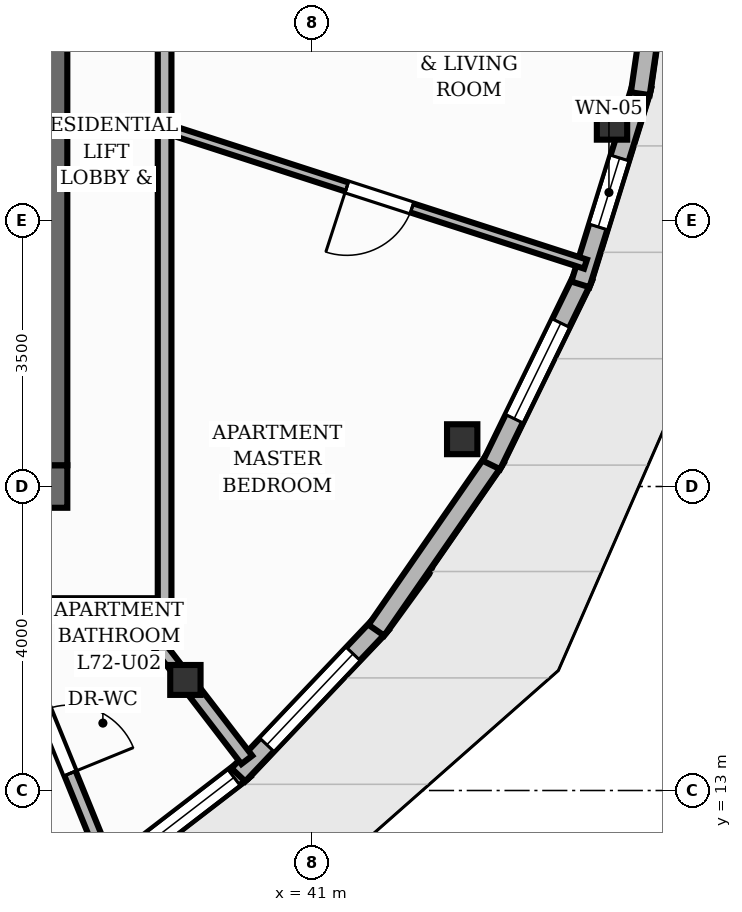
"""IFC4 building model, lengths in metres.
Left out: names, types, materials, properties, quantities, classifications, styles, units other than length and angle.
Written with IfcOpenShell. Run it as: python <this file> out.ifc"""

import sys

from ifc_helpers import new_model, si_unit, direction, frame, frame_2d, origin, origin_2d, place, context, subcontext, project, spatial, rectangle, i_section, extrude, element, fill, save


model = new_model("IFC4")
c1 = context("Model", 3, precision=1e-05, world=origin(), true_north=direction((0.0, 1.0)))
c2 = subcontext(c1, "Body", "Model", "MODEL_VIEW")
j1 = project(units=[si_unit("LENGTHUNIT", "METRE"), si_unit("PLANEANGLEUNIT", "RADIAN")], contexts=[c1])
p1 = place(None, origin())
s1 = spatial("IfcSite", under=j1, at=p1, CompositionType="ELEMENT")
p2 = place(p1, origin())
s2 = spatial("IfcBuilding", under=s1, at=p2, CompositionType="ELEMENT")
p3 = place(p2, frame((0.0, 0.0, 239.84)))
s3 = spatial("IfcBuildingStorey", under=s2, at=p3, CompositionType="ELEMENT", Elevation=239.84)
p4 = place(p3, frame((26.22, 17.0, 0.0), z_axis=(0.0, 0.0, 1.0), x_axis=(1.0, 0.0, 0.0)))
e1 = element("IfcWall", 1, at=p4, inside=s3, PredefinedType="SHEAR", context=c2, shape_type="SweptSolid", body=[
    extrude(rectangle(XDim=11.56, YDim=0.56, at=frame_2d((5.78, 0.0))), origin(), (0.0, 0.0, 1.0), 3.2),
])
p5 = place(p4, frame((2.28, 0.0, 0.0)))
e2 = element("IfcOpeningElement", 2, at=p5, cuts=e1, PredefinedType="OPENING", context=c2, shape_type="SweptSolid", body=[
    extrude(rectangle(XDim=1.1, YDim=2.15, at=frame_2d((0.55, 1.075))), frame((0.0, 0.29, 0.0), z_axis=(0.0, -1.0, 0.0), x_axis=(1.0, 0.0, 0.0)), (0.0, 0.0, 1.0), 0.58),
])
p6 = place(p4, frame((5.83, 0.0, 0.0)))
e3 = element("IfcOpeningElement", 3, at=p6, cuts=e1, PredefinedType="OPENING", context=c2, shape_type="SweptSolid", body=[
    extrude(rectangle(XDim=0.9, YDim=2.1, at=frame_2d((0.45, 1.05))), frame((0.0, 0.29, 0.0), z_axis=(0.0, -1.0, 0.0), x_axis=(1.0, 0.0, 0.0)), (0.0, 0.0, 1.0), 0.58),
])
p7 = place(p3, frame((37.5, 17.28, 0.0), z_axis=(0.0, 0.0, 1.0), x_axis=(0.0, 1.0, 0.0)))
e4 = element("IfcWall", 4, at=p7, inside=s3, PredefinedType="SHEAR", context=c2, shape_type="SweptSolid", body=[
    extrude(rectangle(XDim=13.44, YDim=0.56, at=frame_2d((6.72, 0.0))), origin(), (0.0, 0.0, 1.0), 3.2),
])
for number, where, z_axis, x_axis in (
    (5, (39.333, 14.455, 0.0), (0.0, 0.0, 1.0), (1.0, 0.0, 0.0)),
    (6, (42.975, 17.622, 0.0), (0.0, 0.0, 1.0), (1.0, 0.0, 0.0)),
    (7, (44.946, 21.76, 0.0), (0.0, 0.0, 1.0), (1.0, 0.0, 0.0)),
):
    element("IfcColumn", number, at=place(p3, frame(where, z_axis=z_axis, x_axis=x_axis)), inside=s3, PredefinedType="COLUMN", context=c2, shape_type="SweptSolid", body=[
        extrude(i_section(OverallWidth=0.399, OverallDepth=0.394, WebThickness=0.023, FlangeThickness=0.037, at=origin_2d()), origin(), (0.0, 0.0, 1.0), 3.2),
    ])
p8 = place(p3, frame((40.111, 13.279, 0.0), z_axis=(0.0, 0.0, 1.0), x_axis=(-0.792543354822, -0.609815571076, 0.0)))
e8 = element("IfcWall", 8, at=p8, inside=s3, PredefinedType="SOLIDWALL", context=c2, shape_type="SweptSolid", body=[
    extrude(rectangle(XDim=2.702, YDim=0.25, at=frame_2d((1.351, 0.0))), origin(), (0.0, 0.0, 1.0), 2.88),
])
p9 = place(p8, frame((0.175, 0.0, 0.85)))
e9 = element("IfcOpeningElement", 9, at=p9, cuts=e8, PredefinedType="OPENING", context=c2, shape_type="SweptSolid", body=[
    extrude(rectangle(XDim=1.65, YDim=1.44, at=frame_2d((0.825, 0.72))), frame((0.0, 0.135, 0.0), z_axis=(0.0, -1.0, 0.0), x_axis=(1.0, 0.0, 0.0)), (0.0, 0.0, 1.0), 0.27),
])
p10 = place(p3, frame((41.915, 15.193, 0.0), z_axis=(0.0, 0.0, 1.0), x_axis=(-0.688046261031, -0.725666826223, 0.0)))
e10 = element("IfcWall", 10, at=p10, inside=s3, PredefinedType="SOLIDWALL", context=c2, shape_type="SweptSolid", body=[
    extrude(rectangle(XDim=2.739, YDim=0.25, at=frame_2d((1.369, 0.0))), origin(), (0.0, 0.0, 1.0), 2.88),
])
p11 = place(p10, frame((0.544, 0.0, 0.85)))
e11 = element("IfcOpeningElement", 11, at=p11, cuts=e10, PredefinedType="OPENING", context=c2, shape_type="SweptSolid", body=[
    extrude(rectangle(XDim=1.65, YDim=1.55, at=frame_2d((0.825, 0.775))), frame((0.0, 0.135, 0.0), z_axis=(0.0, -1.0, 0.0), x_axis=(1.0, 0.0, 0.0)), (0.0, 0.0, 1.0), 0.27),
])
p12 = place(p3, frame((43.416, 17.376, 0.0), z_axis=(0.0, 0.0, 1.0), x_axis=(-0.569421689582, -0.822045582333, 0.0)))
e12 = element("IfcWall", 12, at=p12, inside=s3, PredefinedType="SOLIDWALL", context=c2, shape_type="SweptSolid", body=[
    extrude(rectangle(XDim=2.758, YDim=0.25, at=frame_2d((1.379, 0.0))), origin(), (0.0, 0.0, 1.0), 2.88),
])
p13 = place(p3, frame((44.571, 19.761, 0.0), z_axis=(0.0, 0.0, 1.0), x_axis=(-0.438517804861, -0.898722501565, 0.0)))
e13 = element("IfcWall", 13, at=p13, inside=s3, PredefinedType="SOLIDWALL", context=c2, shape_type="SweptSolid", body=[
    extrude(rectangle(XDim=2.758, YDim=0.25, at=frame_2d((1.379, 0.0))), origin(), (0.0, 0.0, 1.0), 2.88),
])
p14 = place(p13, frame((0.679, 0.0, 0.85)))
e14 = element("IfcOpeningElement", 14, at=p14, cuts=e13, PredefinedType="OPENING", context=c2, shape_type="SweptSolid", body=[
    extrude(rectangle(XDim=1.4, YDim=1.55, at=frame_2d((0.7, 0.775))), frame((0.0, 0.135, 0.0), z_axis=(0.0, -1.0, 0.0), x_axis=(1.0, 0.0, 0.0)), (0.0, 0.0, 1.0), 0.27),
])
p15 = place(p3, frame((45.343, 22.275, 0.0), z_axis=(0.0, 0.0, 1.0), x_axis=(-0.29642164717, -0.955057174775, 0.0)))
e15 = element("IfcWall", 15, at=p15, inside=s3, PredefinedType="SOLIDWALL", context=c2, shape_type="SweptSolid", body=[
    extrude(rectangle(XDim=2.739, YDim=0.25, at=frame_2d((1.369, 0.0))), origin(), (0.0, 0.0, 1.0), 2.497),
])
p16 = place(p15, frame((0.997, 0.0, 0.85)))
e16 = element("IfcOpeningElement", 16, at=p16, cuts=e15, PredefinedType="OPENING", context=c2, shape_type="SweptSolid", body=[
    extrude(rectangle(XDim=0.95, YDim=1.45, at=frame_2d((0.475, 0.725))), frame((0.0, 0.135, 0.0), z_axis=(0.0, -1.0, 0.0), x_axis=(1.0, 0.0, 0.0)), (0.0, 0.0, 1.0), 0.27),
])
p17 = place(p3, frame((45.708, 24.842, 0.0), z_axis=(0.0, 0.0, 1.0), x_axis=(-0.144229466115, -0.989544269401, 0.0)))
e17 = element("IfcWall", 17, at=p17, inside=s3, PredefinedType="SOLIDWALL", context=c2, shape_type="SweptSolid", body=[
    extrude(rectangle(XDim=2.702, YDim=0.25, at=frame_2d((1.351, 0.0))), origin(), (0.0, 0.0, 1.0), 2.497),
])
p18 = place(p17, frame((0.651, 0.0, 0.85)))
e18 = element("IfcOpeningElement", 18, at=p18, cuts=e17, PredefinedType="OPENING", context=c2, shape_type="SweptSolid", body=[
    extrude(rectangle(XDim=1.4, YDim=1.55, at=frame_2d((0.7, 0.775))), frame((0.0, 0.135, 0.0), z_axis=(0.0, -1.0, 0.0), x_axis=(1.0, 0.0, 0.0)), (0.0, 0.0, 1.0), 0.27),
])
p19 = place(p3, frame((39.467, 14.281, 0.0), z_axis=(0.0, 0.0, 1.0), x_axis=(0.609209464238, -0.793009349682, 0.0)))
e19 = element("IfcWall", 19, at=p19, inside=s3, PredefinedType="PARTITIONING", context=c2, shape_type="SweptSolid", body=[
    extrude(rectangle(XDim=1.106, YDim=0.18, at=frame_2d((0.553, 0.0))), origin(), (0.0, 0.0, 1.0), 2.323),
])
p20 = place(p3, frame((39.06, 15.44, 0.0), z_axis=(0.0, 0.0, 1.0), x_axis=(-1.0, 0.0, 0.0)))
e20 = element("IfcWall", 20, at=p20, inside=s3, PredefinedType="PARTITIONING", context=c2, shape_type="SweptSolid", body=[
    extrude(rectangle(XDim=5.672, YDim=0.18, at=frame_2d((2.836, 0.0))), origin(), (0.0, 0.0, 1.0), 2.875),
])
p21 = place(p20, frame((3.373, 0.0, 0.0)))
e21 = element("IfcOpeningElement", 21, at=p21, cuts=e20, PredefinedType="OPENING", context=c2, shape_type="SweptSolid", body=[
    extrude(rectangle(XDim=1.05, YDim=2.15, at=frame_2d((0.525, 1.075))), frame((0.0, 0.1, 0.0), z_axis=(0.0, -1.0, 0.0), x_axis=(1.0, 0.0, 0.0)), (0.0, 0.0, 1.0), 0.2),
])
p22 = place(p3, frame((39.06, 29.391, 0.0), z_axis=(0.0, 0.0, 1.0), x_axis=(0.0, -1.0, 0.0)))
e22 = element("IfcWall", 22, at=p22, inside=s3, PredefinedType="PARTITIONING", context=c2, shape_type="SweptSolid", body=[
    extrude(rectangle(XDim=13.951, YDim=0.18, at=frame_2d((6.975, 0.0))), origin(), (0.0, 0.0, 1.0), 2.875),
])
p23 = place(p22, frame((5.593, 0.0, 0.0)))
e23 = element("IfcOpeningElement", 23, at=p23, cuts=e22, PredefinedType="OPENING", context=c2, shape_type="SweptSolid", body=[
    extrude(rectangle(XDim=1.05, YDim=2.15, at=frame_2d((0.525, 1.075))), frame((0.0, 0.1, 0.0), z_axis=(0.0, -1.0, 0.0), x_axis=(1.0, 0.0, 0.0)), (0.0, 0.0, 1.0), 0.2),
])
p24 = place(p22, frame((1.645, 0.0, 0.0)))
e24 = element("IfcOpeningElement", 24, at=p24, cuts=e22, PredefinedType="OPENING", context=c2, shape_type="SweptSolid", body=[
    extrude(rectangle(XDim=0.9, YDim=2.1, at=frame_2d((0.45, 1.05))), frame((0.0, 0.1, 0.0), z_axis=(0.0, -1.0, 0.0), x_axis=(1.0, 0.0, 0.0)), (0.0, 0.0, 1.0), 0.2),
])
p25 = place(p3, frame((36.951, 15.347, 0.0), z_axis=(0.0, 0.0, 1.0), x_axis=(0.377313729351, -0.92608549802, 0.0)))
e25 = element("IfcWall", 25, at=p25, inside=s3, PredefinedType="PLUMBINGWALL", context=c2, shape_type="SweptSolid", body=[
    extrude(rectangle(XDim=3.684, YDim=0.16, at=frame_2d((1.842, 0.0))), origin(), (0.0, 0.0, 1.0), 2.612),
])
p26 = place(p25, frame((1.392, 0.0, 0.0)))
e26 = element("IfcOpeningElement", 26, at=p26, cuts=e25, PredefinedType="OPENING", context=c2, shape_type="SweptSolid", body=[
    extrude(rectangle(XDim=0.9, YDim=2.1, at=frame_2d((0.45, 1.05))), frame((0.0, 0.09, 0.0), z_axis=(0.0, -1.0, 0.0), x_axis=(1.0, 0.0, 0.0)), (0.0, 0.0, 1.0), 0.18),
])
p27 = place(p3, frame((38.637, 15.361, 0.0), z_axis=(0.0, 0.0, 1.0), x_axis=(0.609314315131, -0.7929287896, 0.0)))
e27 = element("IfcWall", 27, at=p27, inside=s3, PredefinedType="PLUMBINGWALL", context=c2, shape_type="SweptSolid", body=[
    extrude(rectangle(XDim=0.923, YDim=0.16, at=frame_2d((0.461, 0.0))), origin(), (0.0, 0.0, 1.0), 2.323),
])
p28 = place(p3, frame((44.598, 19.926, 0.0), z_axis=(0.0, 0.0, 1.0), x_axis=(-0.951480669713, 0.307708523058, 0.0)))
e28 = element("IfcWall", 28, at=p28, inside=s3, PredefinedType="PARTITIONING", context=c2, shape_type="SweptSolid", body=[
    extrude(rectangle(XDim=5.7, YDim=0.125, at=frame_2d((2.85, 0.0))), origin(), (0.0, 0.0, 1.0), 2.612),
])
p29 = place(p28, frame((2.4, 0.0, 0.0)))
e29 = element("IfcOpeningElement", 29, at=p29, cuts=e28, PredefinedType="OPENING", context=c2, shape_type="SweptSolid", body=[
    extrude(rectangle(XDim=0.9, YDim=2.1, at=frame_2d((0.45, 1.05))), frame((0.0, 0.073, 0.0), z_axis=(0.0, -1.0, 0.0), x_axis=(1.0, 0.0, 0.0)), (0.0, 0.0, 1.0), 0.145),
])
p30 = place(p9, origin())
e30 = element("IfcWindow", 30, at=p30, inside=s3, PartitioningType="SINGLE_PANEL", PredefinedType="WINDOW", context=c2, shape_type="SweptSolid", body=[
    extrude(rectangle(XDim=1.65, YDim=1.44, at=frame_2d((0.825, 0.72))), frame((0.0, 0.03, 0.0), z_axis=(0.0, -1.0, 0.0), x_axis=(1.0, 0.0, 0.0)), (0.0, 0.0, 1.0), 0.06),
])
fill(e9, e30)
p31 = place(p11, origin())
e31 = element("IfcWindow", 31, at=p31, inside=s3, PartitioningType="SINGLE_PANEL", PredefinedType="WINDOW", context=c2, shape_type="SweptSolid", body=[
    extrude(rectangle(XDim=1.65, YDim=1.55, at=frame_2d((0.825, 0.775))), frame((0.0, 0.03, 0.0), z_axis=(0.0, -1.0, 0.0), x_axis=(1.0, 0.0, 0.0)), (0.0, 0.0, 1.0), 0.06),
])
fill(e11, e31)
p32 = place(p14, origin())
e32 = element("IfcWindow", 32, at=p32, inside=s3, PartitioningType="SINGLE_PANEL", PredefinedType="WINDOW", context=c2, shape_type="SweptSolid", body=[
    extrude(rectangle(XDim=1.4, YDim=1.55, at=frame_2d((0.7, 0.775))), frame((0.0, 0.03, 0.0), z_axis=(0.0, -1.0, 0.0), x_axis=(1.0, 0.0, 0.0)), (0.0, 0.0, 1.0), 0.06),
])
fill(e14, e32)
p33 = place(p16, origin())
e33 = element("IfcWindow", 33, at=p33, inside=s3, PartitioningType="SINGLE_PANEL", PredefinedType="WINDOW", context=c2, shape_type="SweptSolid", body=[
    extrude(rectangle(XDim=0.95, YDim=1.45, at=frame_2d((0.475, 0.725))), frame((0.0, 0.03, 0.0), z_axis=(0.0, -1.0, 0.0), x_axis=(1.0, 0.0, 0.0)), (0.0, 0.0, 1.0), 0.06),
])
fill(e16, e33)
p34 = place(p26, origin())
e34 = element("IfcDoor", 34, at=p34, inside=s3, OperationType="SINGLE_SWING_RIGHT", PredefinedType="DOOR", context=c2, shape_type="SweptSolid", body=[
    extrude(rectangle(XDim=0.9, YDim=2.1, at=frame_2d((0.45, 1.05))), frame((0.0, 0.025, 0.0), z_axis=(0.0, -1.0, 0.0), x_axis=(1.0, 0.0, 0.0)), (0.0, 0.0, 1.0), 0.05),
])
fill(e26, e34)
p35 = place(p29, origin())
e35 = element("IfcDoor", 35, at=p35, inside=s3, OperationType="SINGLE_SWING_RIGHT", PredefinedType="DOOR", context=c2, shape_type="SweptSolid", body=[
    extrude(rectangle(XDim=0.9, YDim=2.1, at=frame_2d((0.45, 1.05))), frame((0.0, 0.025, 0.0), z_axis=(0.0, -1.0, 0.0), x_axis=(1.0, 0.0, 0.0)), (0.0, 0.0, 1.0), 0.05),
])
fill(e29, e35)
save(model, sys.argv[1])
